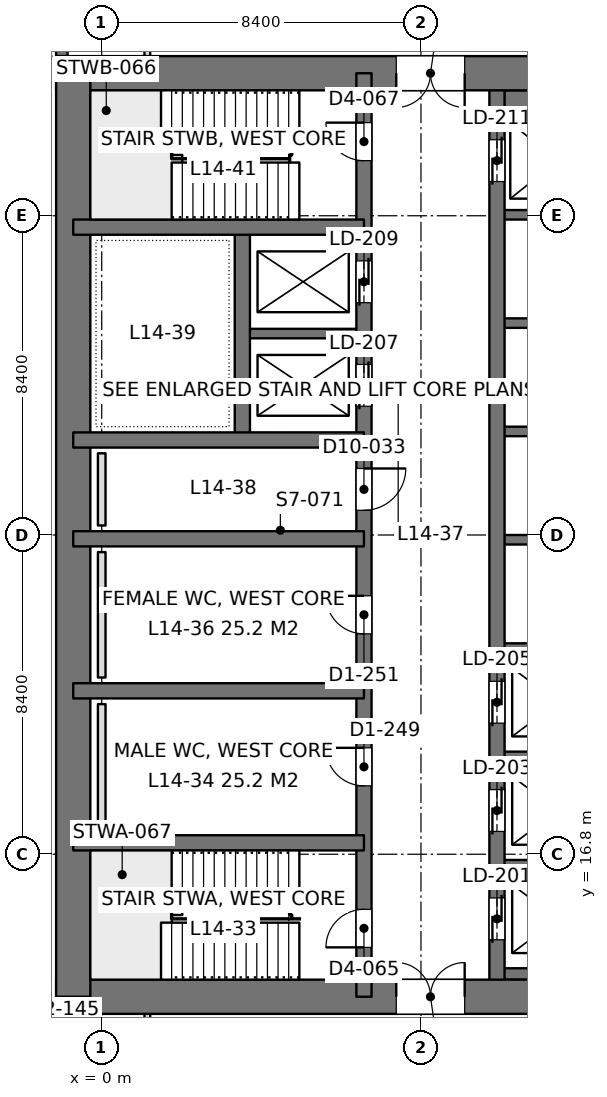
"""IFC4 building model, lengths in metres.
Left out: names, types, materials, properties, quantities, classifications, styles, units other than length and angle.
Written with IfcOpenShell. Run it as: python <this file> out.ifc"""

import sys

from ifc_helpers import new_model, si_unit, direction, frame, frame_2d, origin, place, context, subcontext, project, spatial, rectangle, extrude, element, fill, save


model = new_model("IFC4")
c1 = context("Model", 3, precision=1e-05, world=origin(), true_north=direction((0.0, 1.0)))
c2 = subcontext(c1, "Body", "Model", "MODEL_VIEW")
j1 = project(units=[si_unit("LENGTHUNIT", "METRE"), si_unit("PLANEANGLEUNIT", "RADIAN")], contexts=[c1])
p1 = place(None, origin())
s1 = spatial("IfcSite", under=j1, at=p1, CompositionType="ELEMENT")
p2 = place(p1, origin())
s2 = spatial("IfcBuilding", under=s1, at=p2, CompositionType="ELEMENT")
p3 = place(p2, frame((0.0, 0.0, 63.9)))
s3 = spatial("IfcBuildingStorey", under=s2, at=p3, CompositionType="ELEMENT", Elevation=63.9)
p4 = place(p3, frame((-1.2, 13.05, 0.0), z_axis=(0.0, 0.0, 1.0), x_axis=(1.0, 0.0, 0.0)))
e1 = element("IfcWall", 1, at=p4, inside=s3, PredefinedType="SHEAR", context=c2, shape_type="SweptSolid", body=[
    extrude(rectangle(XDim=18.0, YDim=0.9, at=frame_2d((9.0, 0.0))), origin(), (0.0, 0.0, 1.0), 4.5),
])
p5 = place(p4, frame((8.95, 0.0, 0.0)))
e2 = element("IfcOpeningElement", 2, at=p5, cuts=e1, PredefinedType="OPENING", context=c2, shape_type="SweptSolid", body=[
    extrude(rectangle(XDim=1.8, YDim=2.4, at=frame_2d((0.9, 1.2))), frame((0.0, 0.46, 0.0), z_axis=(0.0, -1.0, 0.0), x_axis=(1.0, 0.0, 0.0)), (0.0, 0.0, 1.0), 0.92),
])
p6 = place(p3, frame((-1.2, 37.35, 0.0), z_axis=(0.0, 0.0, 1.0), x_axis=(1.0, 0.0, 0.0)))
e3 = element("IfcWall", 3, at=p6, inside=s3, PredefinedType="SHEAR", context=c2, shape_type="SweptSolid", body=[
    extrude(rectangle(XDim=18.0, YDim=0.9, at=frame_2d((9.0, 0.0))), origin(), (0.0, 0.0, 1.0), 4.5),
])
p7 = place(p6, frame((8.95, 0.0, 0.0)))
e4 = element("IfcOpeningElement", 4, at=p7, cuts=e3, PredefinedType="OPENING", context=c2, shape_type="SweptSolid", body=[
    extrude(rectangle(XDim=1.8, YDim=2.4, at=frame_2d((0.9, 1.2))), frame((0.0, 0.46, 0.0), z_axis=(0.0, -1.0, 0.0), x_axis=(1.0, 0.0, 0.0)), (0.0, 0.0, 1.0), 0.92),
])
p8 = place(p3, frame((-0.75, 13.05, 0.0), z_axis=(0.0, 0.0, 1.0), x_axis=(0.0, 1.0, 0.0)))
e5 = element("IfcWall", 5, at=p8, inside=s3, PredefinedType="SHEAR", context=c2, shape_type="SweptSolid", body=[
    extrude(rectangle(XDim=24.3, YDim=0.9, at=frame_2d((12.15, 0.0))), origin(), (0.0, 0.0, 1.0), 4.5),
])
p9 = place(p3, frame((6.9, 13.05, 0.0), z_axis=(0.0, 0.0, 1.0), x_axis=(0.0, 1.0, 0.0)))
e6 = element("IfcWall", 6, at=p9, inside=s3, PredefinedType="SHEAR", context=c2, shape_type="SweptSolid", body=[
    extrude(rectangle(XDim=24.3, YDim=0.4, at=frame_2d((12.15, 0.0))), origin(), (0.0, 0.0, 1.0), 4.5),
])
p10 = place(p9, frame((1.3, 0.0, 0.0)))
e7 = element("IfcOpeningElement", 7, at=p10, cuts=e6, PredefinedType="OPENING", context=c2, shape_type="SweptSolid", body=[
    extrude(rectangle(XDim=1.0, YDim=2.2, at=frame_2d((0.5, 1.1))), frame((0.0, 0.21, 0.0), z_axis=(0.0, -1.0, 0.0), x_axis=(1.0, 0.0, 0.0)), (0.0, 0.0, 1.0), 0.42),
])
p11 = place(p9, frame((22.0, 0.0, 0.0)))
e8 = element("IfcOpeningElement", 8, at=p11, cuts=e6, PredefinedType="OPENING", context=c2, shape_type="SweptSolid", body=[
    extrude(rectangle(XDim=1.0, YDim=2.2, at=frame_2d((0.5, 1.1))), frame((0.0, 0.21, 0.0), z_axis=(0.0, -1.0, 0.0), x_axis=(1.0, 0.0, 0.0)), (0.0, 0.0, 1.0), 0.42),
])
p12 = place(p9, frame((5.55, 0.0, 0.0)))
e9 = element("IfcOpeningElement", 9, at=p12, cuts=e6, PredefinedType="OPENING", context=c2, shape_type="SweptSolid", body=[
    extrude(rectangle(XDim=1.0, YDim=2.2, at=frame_2d((0.5, 1.1))), frame((0.0, 0.21, 0.0), z_axis=(0.0, -1.0, 0.0), x_axis=(1.0, 0.0, 0.0)), (0.0, 0.0, 1.0), 0.42),
])
p13 = place(p9, frame((9.55, 0.0, 0.0)))
e10 = element("IfcOpeningElement", 10, at=p13, cuts=e6, PredefinedType="OPENING", context=c2, shape_type="SweptSolid", body=[
    extrude(rectangle(XDim=1.0, YDim=2.2, at=frame_2d((0.5, 1.1))), frame((0.0, 0.21, 0.0), z_axis=(0.0, -1.0, 0.0), x_axis=(1.0, 0.0, 0.0)), (0.0, 0.0, 1.0), 0.42),
])
p14 = place(p9, frame((12.8, 0.0, 0.0)))
e11 = element("IfcOpeningElement", 11, at=p14, cuts=e6, PredefinedType="OPENING", context=c2, shape_type="SweptSolid", body=[
    extrude(rectangle(XDim=1.1, YDim=2.2, at=frame_2d((0.55, 1.1))), frame((0.0, 0.21, 0.0), z_axis=(0.0, -1.0, 0.0), x_axis=(1.0, 0.0, 0.0)), (0.0, 0.0, 1.0), 0.42),
])
p15 = place(p9, frame((15.538, 0.0, 0.0)))
e12 = element("IfcOpeningElement", 12, at=p15, cuts=e6, PredefinedType="OPENING", context=c2, shape_type="SweptSolid", body=[
    extrude(rectangle(XDim=1.1, YDim=2.2, at=frame_2d((0.55, 1.1))), frame((0.0, 0.21, 0.0), z_axis=(0.0, -1.0, 0.0), x_axis=(1.0, 0.0, 0.0)), (0.0, 0.0, 1.0), 0.42),
])
p16 = place(p9, frame((18.262, 0.0, 0.0)))
e13 = element("IfcOpeningElement", 13, at=p16, cuts=e6, PredefinedType="OPENING", context=c2, shape_type="SweptSolid", body=[
    extrude(rectangle(XDim=1.1, YDim=2.2, at=frame_2d((0.55, 1.1))), frame((0.0, 0.21, 0.0), z_axis=(0.0, -1.0, 0.0), x_axis=(1.0, 0.0, 0.0)), (0.0, 0.0, 1.0), 0.42),
])
p17 = place(p3, frame((10.4, 13.05, 0.0), z_axis=(0.0, 0.0, 1.0), x_axis=(0.0, 1.0, 0.0)))
e14 = element("IfcWall", 14, at=p17, inside=s3, PredefinedType="SHEAR", context=c2, shape_type="SweptSolid", body=[
    extrude(rectangle(XDim=24.3, YDim=0.4, at=frame_2d((12.15, 0.0))), origin(), (0.0, 0.0, 1.0), 4.5),
])
p18 = place(p17, frame((1.5, 0.0, 0.0)))
e15 = element("IfcOpeningElement", 15, at=p18, cuts=e14, PredefinedType="OPENING", context=c2, shape_type="SweptSolid", body=[
    extrude(rectangle(XDim=1.1, YDim=2.2, at=frame_2d((0.55, 1.1))), frame((0.0, 0.21, 0.0), z_axis=(0.0, -1.0, 0.0), x_axis=(1.0, 0.0, 0.0)), (0.0, 0.0, 1.0), 0.42),
])
p19 = place(p17, frame((4.35, 0.0, 0.0)))
e16 = element("IfcOpeningElement", 16, at=p19, cuts=e14, PredefinedType="OPENING", context=c2, shape_type="SweptSolid", body=[
    extrude(rectangle(XDim=1.1, YDim=2.2, at=frame_2d((0.55, 1.1))), frame((0.0, 0.21, 0.0), z_axis=(0.0, -1.0, 0.0), x_axis=(1.0, 0.0, 0.0)), (0.0, 0.0, 1.0), 0.42),
])
p20 = place(p17, frame((7.2, 0.0, 0.0)))
e17 = element("IfcOpeningElement", 17, at=p20, cuts=e14, PredefinedType="OPENING", context=c2, shape_type="SweptSolid", body=[
    extrude(rectangle(XDim=1.1, YDim=2.2, at=frame_2d((0.55, 1.1))), frame((0.0, 0.21, 0.0), z_axis=(0.0, -1.0, 0.0), x_axis=(1.0, 0.0, 0.0)), (0.0, 0.0, 1.0), 0.42),
])
p21 = place(p17, frame((21.45, 0.0, 0.0)))
e18 = element("IfcOpeningElement", 18, at=p21, cuts=e14, PredefinedType="OPENING", context=c2, shape_type="SweptSolid", body=[
    extrude(rectangle(XDim=1.1, YDim=2.2, at=frame_2d((0.55, 1.1))), frame((0.0, 0.21, 0.0), z_axis=(0.0, -1.0, 0.0), x_axis=(1.0, 0.0, 0.0)), (0.0, 0.0, 1.0), 0.42),
])
for number, where, z_axis, x_axis in (
    (19, (-0.75, 17.1, 0.0), (0.0, 0.0, 1.0), (1.0, 0.0, 0.0)),
    (20, (-0.75, 21.1, 0.0), (0.0, 0.0, 1.0), (1.0, 0.0, 0.0)),
    (21, (-0.75, 25.1, 0.0), (0.0, 0.0, 1.0), (1.0, 0.0, 0.0)),
    (22, (-0.75, 27.7, 0.0), (0.0, 0.0, 1.0), (1.0, 0.0, 0.0)),
    (23, (-0.75, 33.3, 0.0), (0.0, 0.0, 1.0), (1.0, 0.0, 0.0)),
):
    element("IfcWall", number, at=place(p3, frame(where, z_axis=z_axis, x_axis=x_axis)), inside=s3, PredefinedType="SHEAR", context=c2, shape_type="SweptSolid", body=[
        extrude(rectangle(XDim=7.65, YDim=0.4, at=frame_2d((3.825, 0.0))), origin(), (0.0, 0.0, 1.0), 4.5),
    ])
p22 = place(p3, frame((3.7, 27.7, 0.0), z_axis=(0.0, 0.0, 1.0), x_axis=(0.0, 1.0, 0.0)))
e24 = element("IfcWall", 24, at=p22, inside=s3, PredefinedType="SHEAR", context=c2, shape_type="SweptSolid", body=[
    extrude(rectangle(XDim=5.6, YDim=0.4, at=frame_2d((2.8, 0.0))), origin(), (0.0, 0.0, 1.0), 4.5),
])
p23 = place(p3, frame((3.7, 30.5, 0.0), z_axis=(0.0, 0.0, 1.0), x_axis=(1.0, 0.0, 0.0)))
e25 = element("IfcWall", 25, at=p23, inside=s3, PredefinedType="SHEAR", context=c2, shape_type="SweptSolid", body=[
    extrude(rectangle(XDim=3.2, YDim=0.25, at=frame_2d((1.6, 0.0))), origin(), (0.0, 0.0, 1.0), 4.5),
])
p24 = place(p3, frame((10.4, 13.65, 0.0), z_axis=(0.0, 0.0, 1.0), x_axis=(1.0, 0.0, 0.0)))
e26 = element("IfcWall", 26, at=p24, inside=s3, PredefinedType="SHEAR", context=c2, shape_type="SweptSolid", body=[
    extrude(rectangle(XDim=3.2, YDim=0.3, at=frame_2d((1.6, 0.0))), origin(), (0.0, 0.0, 1.0), 4.5),
])
for number, where, z_axis, x_axis in (
    (27, (10.4, 16.525, 0.0), (0.0, 0.0, 1.0), (1.0, 0.0, 0.0)),
    (28, (10.4, 19.375, 0.0), (0.0, 0.0, 1.0), (1.0, 0.0, 0.0)),
    (29, (10.4, 22.225, 0.0), (0.0, 0.0, 1.0), (1.0, 0.0, 0.0)),
    (30, (10.4, 25.075, 0.0), (0.0, 0.0, 1.0), (1.0, 0.0, 0.0)),
    (31, (10.4, 27.925, 0.0), (0.0, 0.0, 1.0), (1.0, 0.0, 0.0)),
    (32, (10.4, 30.775, 0.0), (0.0, 0.0, 1.0), (1.0, 0.0, 0.0)),
    (33, (10.4, 33.625, 0.0), (0.0, 0.0, 1.0), (1.0, 0.0, 0.0)),
):
    element("IfcWall", number, at=place(p3, frame(where, z_axis=z_axis, x_axis=x_axis)), inside=s3, PredefinedType="SHEAR", context=c2, shape_type="SweptSolid", body=[
        extrude(rectangle(XDim=3.2, YDim=0.25, at=frame_2d((1.6, 0.0))), origin(), (0.0, 0.0, 1.0), 4.5),
    ])
p25 = place(p3, frame((10.4, 36.625, 0.0), z_axis=(0.0, 0.0, 1.0), x_axis=(1.0, 0.0, 0.0)))
e34 = element("IfcWall", 34, at=p25, inside=s3, PredefinedType="SHEAR", context=c2, shape_type="SweptSolid", body=[
    extrude(rectangle(XDim=3.2, YDim=0.55, at=frame_2d((1.6, 0.0))), origin(), (0.0, 0.0, 1.0), 4.5),
])
p26 = place(p3, frame((-1.05, 8.4, 0.0), z_axis=(0.0, 0.0, 1.0), x_axis=(0.0, 1.0, 0.0)))
e35 = element("IfcWall", 35, at=p26, inside=s3, PredefinedType="SOLIDWALL", context=c2, shape_type="SweptSolid", body=[
    extrude(rectangle(XDim=4.2, YDim=0.3, at=frame_2d((2.1, 0.0))), origin(), (0.0, 0.0, 1.0), 4.34),
])
p27 = place(p26, frame((0.9, 0.0, 0.9)))
e36 = element("IfcOpeningElement", 36, at=p27, cuts=e35, PredefinedType="OPENING", context=c2, shape_type="SweptSolid", body=[
    extrude(rectangle(XDim=2.4, YDim=1.9, at=frame_2d((1.2, 0.95))), frame((0.0, 0.16, 0.0), z_axis=(0.0, -1.0, 0.0), x_axis=(1.0, 0.0, 0.0)), (0.0, 0.0, 1.0), 0.32),
])
p28 = place(p3, frame((-1.05, 37.8, 0.0), z_axis=(0.0, 0.0, 1.0), x_axis=(0.0, 1.0, 0.0)))
e37 = element("IfcWall", 37, at=p28, inside=s3, PredefinedType="SOLIDWALL", context=c2, shape_type="SweptSolid", body=[
    extrude(rectangle(XDim=4.2, YDim=0.3, at=frame_2d((2.1, 0.0))), origin(), (0.0, 0.0, 1.0), 4.34),
])
p29 = place(p28, frame((0.9, 0.0, 0.9)))
e38 = element("IfcOpeningElement", 38, at=p29, cuts=e37, PredefinedType="OPENING", context=c2, shape_type="SweptSolid", body=[
    extrude(rectangle(XDim=2.4, YDim=1.9, at=frame_2d((1.2, 0.95))), frame((0.0, 0.16, 0.0), z_axis=(0.0, -1.0, 0.0), x_axis=(1.0, 0.0, 0.0)), (0.0, 0.0, 1.0), 0.32),
])
p30 = place(p3, frame((1.2, 10.0, 0.0), z_axis=(0.0, 0.0, 1.0), x_axis=(0.0, 1.0, 0.0)))
e39 = element("IfcWall", 39, at=p30, inside=s3, PredefinedType="PARTITIONING", context=c2, shape_type="SweptSolid", body=[
    extrude(rectangle(XDim=2.602, YDim=0.15, at=frame_2d((1.301, 0.0))), origin(), (0.0, 0.0, 1.0), 4.34),
])
p31 = place(p3, frame((1.2, 37.8, 0.0), z_axis=(0.0, 0.0, 1.0), x_axis=(0.0, 1.0, 0.0)))
e40 = element("IfcWall", 40, at=p31, inside=s3, PredefinedType="PARTITIONING", context=c2, shape_type="SweptSolid", body=[
    extrude(rectangle(XDim=2.6, YDim=0.15, at=frame_2d((1.3, 0.0))), origin(), (0.0, 0.0, 1.0), 4.34),
])
for number, where, z_axis, x_axis in (
    (41, (0.0, 17.45, 0.0), (0.0, 0.0, 1.0), (0.0, 1.0, 0.0)),
    (42, (0.0, 21.45, 0.0), (0.0, 0.0, 1.0), (0.0, 1.0, 0.0)),
):
    element("IfcWall", number, at=place(p3, frame(where, z_axis=z_axis, x_axis=x_axis)), inside=s3, PredefinedType="PLUMBINGWALL", context=c2, shape_type="SweptSolid", body=[
        extrude(rectangle(XDim=3.3, YDim=0.2, at=frame_2d((1.65, 0.0))), origin(), (0.0, 0.0, 1.0), 1.2),
    ])
p32 = place(p3, frame((0.0, 25.45, 0.0), z_axis=(0.0, 0.0, 1.0), x_axis=(0.0, 1.0, 0.0)))
e43 = element("IfcWall", 43, at=p32, inside=s3, PredefinedType="PLUMBINGWALL", context=c2, shape_type="SweptSolid", body=[
    extrude(rectangle(XDim=1.9, YDim=0.2, at=frame_2d((0.95, 0.0))), origin(), (0.0, 0.0, 1.0), 1.2),
])
p33 = place(p5, origin())
e44 = element("IfcDoor", 44, at=p33, inside=s3, OperationType="DOUBLE_DOOR_SINGLE_SWING", PredefinedType="DOOR", context=c2, shape_type="SweptSolid", body=[
    extrude(rectangle(XDim=1.8, YDim=2.4, at=frame_2d((0.9, 1.2))), frame((0.0, 0.025, 0.0), z_axis=(0.0, -1.0, 0.0), x_axis=(1.0, 0.0, 0.0)), (0.0, 0.0, 1.0), 0.05),
])
fill(e2, e44)
p34 = place(p7, frame((1.8, 0.0, 0.0), z_axis=(0.0, 0.0, 1.0), x_axis=(-1.0, 0.0, 0.0)))
e45 = element("IfcDoor", 45, at=p34, inside=s3, OperationType="DOUBLE_DOOR_SINGLE_SWING", PredefinedType="DOOR", context=c2, shape_type="SweptSolid", body=[
    extrude(rectangle(XDim=1.8, YDim=2.4, at=frame_2d((0.9, 1.2))), frame((0.0, 0.025, 0.0), z_axis=(0.0, -1.0, 0.0), x_axis=(1.0, 0.0, 0.0)), (0.0, 0.0, 1.0), 0.05),
])
fill(e4, e45)
p35 = place(p10, origin())
e46 = element("IfcDoor", 46, at=p35, inside=s3, OperationType="SINGLE_SWING_LEFT", PredefinedType="DOOR", context=c2, shape_type="SweptSolid", body=[
    extrude(rectangle(XDim=1.0, YDim=2.2, at=frame_2d((0.5, 1.1))), frame((0.0, 0.025, 0.0), z_axis=(0.0, -1.0, 0.0), x_axis=(1.0, 0.0, 0.0)), (0.0, 0.0, 1.0), 0.05),
])
fill(e7, e46)
p36 = place(p11, origin())
e47 = element("IfcDoor", 47, at=p36, inside=s3, OperationType="SINGLE_SWING_RIGHT", PredefinedType="DOOR", context=c2, shape_type="SweptSolid", body=[
    extrude(rectangle(XDim=1.0, YDim=2.2, at=frame_2d((0.5, 1.1))), frame((0.0, 0.025, 0.0), z_axis=(0.0, -1.0, 0.0), x_axis=(1.0, 0.0, 0.0)), (0.0, 0.0, 1.0), 0.05),
])
fill(e8, e47)
p37 = place(p12, origin())
e48 = element("IfcDoor", 48, at=p37, inside=s3, OperationType="SINGLE_SWING_RIGHT", PredefinedType="DOOR", context=c2, shape_type="SweptSolid", body=[
    extrude(rectangle(XDim=1.0, YDim=2.2, at=frame_2d((0.5, 1.1))), frame((0.0, 0.025, 0.0), z_axis=(0.0, -1.0, 0.0), x_axis=(1.0, 0.0, 0.0)), (0.0, 0.0, 1.0), 0.05),
])
fill(e9, e48)
p38 = place(p13, origin())
e49 = element("IfcDoor", 49, at=p38, inside=s3, OperationType="SINGLE_SWING_RIGHT", PredefinedType="DOOR", context=c2, shape_type="SweptSolid", body=[
    extrude(rectangle(XDim=1.0, YDim=2.2, at=frame_2d((0.5, 1.1))), frame((0.0, 0.025, 0.0), z_axis=(0.0, -1.0, 0.0), x_axis=(1.0, 0.0, 0.0)), (0.0, 0.0, 1.0), 0.05),
])
fill(e10, e49)
p39 = place(p14, frame((1.1, 0.0, 0.0), z_axis=(0.0, 0.0, 1.0), x_axis=(-1.0, 0.0, 0.0)))
e50 = element("IfcDoor", 50, at=p39, inside=s3, OperationType="SINGLE_SWING_LEFT", PredefinedType="DOOR", context=c2, shape_type="SweptSolid", body=[
    extrude(rectangle(XDim=1.1, YDim=2.2, at=frame_2d((0.55, 1.1))), frame((0.0, 0.025, 0.0), z_axis=(0.0, -1.0, 0.0), x_axis=(1.0, 0.0, 0.0)), (0.0, 0.0, 1.0), 0.05),
])
fill(e11, e50)
p40 = place(p18, origin())
e51 = element("IfcDoor", 51, at=p40, inside=s3, OperationType="DOUBLE_DOOR_SLIDING", PredefinedType="DOOR", context=c2, shape_type="SweptSolid", body=[
    extrude(rectangle(XDim=1.1, YDim=2.2, at=frame_2d((0.55, 1.1))), frame((0.0, 0.025, 0.0), z_axis=(0.0, -1.0, 0.0), x_axis=(1.0, 0.0, 0.0)), (0.0, 0.0, 1.0), 0.05),
])
fill(e15, e51)
p41 = place(p19, origin())
e52 = element("IfcDoor", 52, at=p41, inside=s3, OperationType="DOUBLE_DOOR_SLIDING", PredefinedType="DOOR", context=c2, shape_type="SweptSolid", body=[
    extrude(rectangle(XDim=1.1, YDim=2.2, at=frame_2d((0.55, 1.1))), frame((0.0, 0.025, 0.0), z_axis=(0.0, -1.0, 0.0), x_axis=(1.0, 0.0, 0.0)), (0.0, 0.0, 1.0), 0.05),
])
fill(e16, e52)
p42 = place(p20, origin())
e53 = element("IfcDoor", 53, at=p42, inside=s3, OperationType="DOUBLE_DOOR_SLIDING", PredefinedType="DOOR", context=c2, shape_type="SweptSolid", body=[
    extrude(rectangle(XDim=1.1, YDim=2.2, at=frame_2d((0.55, 1.1))), frame((0.0, 0.025, 0.0), z_axis=(0.0, -1.0, 0.0), x_axis=(1.0, 0.0, 0.0)), (0.0, 0.0, 1.0), 0.05),
])
fill(e17, e53)
p43 = place(p21, origin())
e54 = element("IfcDoor", 54, at=p43, inside=s3, OperationType="DOUBLE_DOOR_SLIDING", PredefinedType="DOOR", context=c2, shape_type="SweptSolid", body=[
    extrude(rectangle(XDim=1.1, YDim=2.2, at=frame_2d((0.55, 1.1))), frame((0.0, 0.025, 0.0), z_axis=(0.0, -1.0, 0.0), x_axis=(1.0, 0.0, 0.0)), (0.0, 0.0, 1.0), 0.05),
])
fill(e18, e54)
p44 = place(p15, origin())
e55 = element("IfcDoor", 55, at=p44, inside=s3, OperationType="DOUBLE_DOOR_SLIDING", PredefinedType="DOOR", context=c2, shape_type="SweptSolid", body=[
    extrude(rectangle(XDim=1.1, YDim=2.2, at=frame_2d((0.55, 1.1))), frame((0.0, 0.025, 0.0), z_axis=(0.0, -1.0, 0.0), x_axis=(1.0, 0.0, 0.0)), (0.0, 0.0, 1.0), 0.05),
])
fill(e12, e55)
p45 = place(p16, origin())
e56 = element("IfcDoor", 56, at=p45, inside=s3, OperationType="DOUBLE_DOOR_SLIDING", PredefinedType="DOOR", context=c2, shape_type="SweptSolid", body=[
    extrude(rectangle(XDim=1.1, YDim=2.2, at=frame_2d((0.55, 1.1))), frame((0.0, 0.025, 0.0), z_axis=(0.0, -1.0, 0.0), x_axis=(1.0, 0.0, 0.0)), (0.0, 0.0, 1.0), 0.05),
])
fill(e13, e56)
save(model, sys.argv[1])
